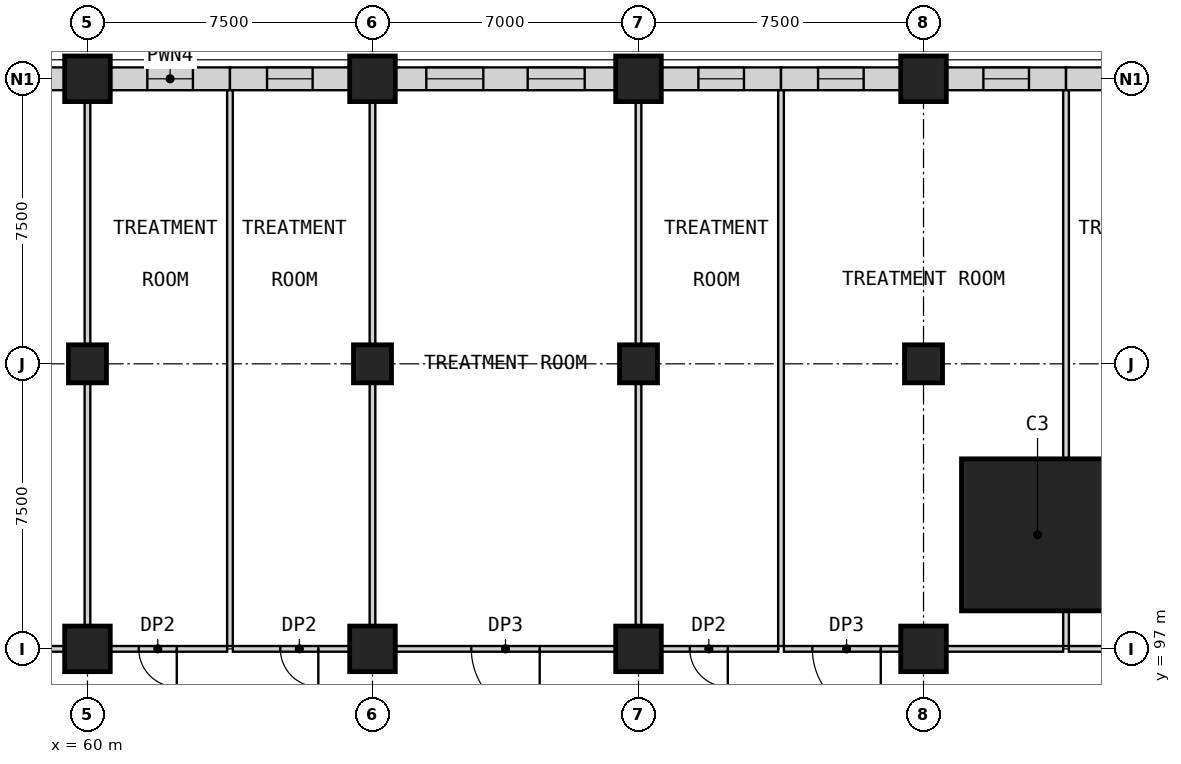
"""IFC4 building model, lengths in metres.
Left out: names, types, materials, properties, quantities, classifications, styles, units other than length and angle.
Written with IfcOpenShell. Run it as: python <this file> out.ifc"""

import sys

from ifc_helpers import new_model, si_unit, direction, frame, frame_2d, origin, origin_2d, place, context, subcontext, project, spatial, rectangle, extrude, element, fill, save


model = new_model("IFC4")
c1 = context("Model", 3, precision=1e-05, world=origin(), true_north=direction((0.0, 1.0)))
c2 = subcontext(c1, "Body", "Model", "MODEL_VIEW")
j1 = project(units=[si_unit("LENGTHUNIT", "METRE"), si_unit("PLANEANGLEUNIT", "RADIAN")], contexts=[c1])
p1 = place(None, origin())
s1 = spatial("IfcSite", under=j1, at=p1, CompositionType="ELEMENT")
p2 = place(p1, origin())
s2 = spatial("IfcBuilding", under=s1, at=p2, CompositionType="ELEMENT")
p3 = place(p2, frame((0.0, 0.0, 29.0)))
s3 = spatial("IfcBuildingStorey", under=s2, at=p3, CompositionType="ELEMENT", Elevation=29.0)
p4 = place(p3, frame((60.0, 97.0, 0.0), z_axis=(0.0, 0.0, 1.0), x_axis=(1.0, 0.0, 0.0)))
e1 = element("IfcColumn", 1, at=p4, inside=s3, PredefinedType="COLUMN", context=c2, shape_type="SweptSolid", body=[
    extrude(rectangle(XDim=1.2, YDim=1.2, at=origin_2d()), origin(), (0.0, 0.0, 1.0), 5.0),
])
p5 = place(p3, frame((60.0, 104.5, 0.0), z_axis=(0.0, 0.0, 1.0), x_axis=(1.0, 0.0, 0.0)))
e2 = element("IfcColumn", 2, at=p5, inside=s3, PredefinedType="COLUMN", context=c2, shape_type="SweptSolid", body=[
    extrude(rectangle(XDim=1.0, YDim=1.0, at=origin_2d()), origin(), (0.0, 0.0, 1.0), 5.0),
])
p6 = place(p3, frame((67.5, 97.0, 0.0), z_axis=(0.0, 0.0, 1.0), x_axis=(1.0, 0.0, 0.0)))
e3 = element("IfcColumn", 3, at=p6, inside=s3, PredefinedType="COLUMN", context=c2, shape_type="SweptSolid", body=[
    extrude(rectangle(XDim=1.2, YDim=1.2, at=origin_2d()), origin(), (0.0, 0.0, 1.0), 5.0),
])
p7 = place(p3, frame((67.5, 104.5, 0.0), z_axis=(0.0, 0.0, 1.0), x_axis=(1.0, 0.0, 0.0)))
e4 = element("IfcColumn", 4, at=p7, inside=s3, PredefinedType="COLUMN", context=c2, shape_type="SweptSolid", body=[
    extrude(rectangle(XDim=1.0, YDim=1.0, at=origin_2d()), origin(), (0.0, 0.0, 1.0), 5.0),
])
p8 = place(p3, frame((74.5, 97.0, 0.0), z_axis=(0.0, 0.0, 1.0), x_axis=(1.0, 0.0, 0.0)))
e5 = element("IfcColumn", 5, at=p8, inside=s3, PredefinedType="COLUMN", context=c2, shape_type="SweptSolid", body=[
    extrude(rectangle(XDim=1.2, YDim=1.2, at=origin_2d()), origin(), (0.0, 0.0, 1.0), 5.0),
])
p9 = place(p3, frame((74.5, 104.5, 0.0), z_axis=(0.0, 0.0, 1.0), x_axis=(1.0, 0.0, 0.0)))
e6 = element("IfcColumn", 6, at=p9, inside=s3, PredefinedType="COLUMN", context=c2, shape_type="SweptSolid", body=[
    extrude(rectangle(XDim=1.0, YDim=1.0, at=origin_2d()), origin(), (0.0, 0.0, 1.0), 5.0),
])
p10 = place(p3, frame((82.0, 97.0, 0.0), z_axis=(0.0, 0.0, 1.0), x_axis=(1.0, 0.0, 0.0)))
e7 = element("IfcColumn", 7, at=p10, inside=s3, PredefinedType="COLUMN", context=c2, shape_type="SweptSolid", body=[
    extrude(rectangle(XDim=1.2, YDim=1.2, at=origin_2d()), origin(), (0.0, 0.0, 1.0), 5.0),
])
p11 = place(p3, frame((82.0, 104.5, 0.0), z_axis=(0.0, 0.0, 1.0), x_axis=(1.0, 0.0, 0.0)))
e8 = element("IfcColumn", 8, at=p11, inside=s3, PredefinedType="COLUMN", context=c2, shape_type="SweptSolid", body=[
    extrude(rectangle(XDim=1.0, YDim=1.0, at=origin_2d()), origin(), (0.0, 0.0, 1.0), 5.0),
])
p12 = place(p3, frame((85.0, 100.0, 0.0), z_axis=(0.0, 0.0, 1.0), x_axis=(1.0, 0.0, 0.0)))
e9 = element("IfcColumn", 9, at=p12, inside=s3, PredefinedType="COLUMN", context=c2, shape_type="SweptSolid", body=[
    extrude(rectangle(XDim=4.0, YDim=4.0, at=origin_2d()), origin(), (0.0, 0.0, 1.0), 5.0),
])
for number, where, z_axis, x_axis in (
    (10, (60.0, 112.0, 0.0), (0.0, 0.0, 1.0), (1.0, 0.0, 0.0)),
    (11, (67.5, 112.0, 0.0), (0.0, 0.0, 1.0), (1.0, 0.0, 0.0)),
    (12, (74.5, 112.0, 0.0), (0.0, 0.0, 1.0), (1.0, 0.0, 0.0)),
    (13, (82.0, 112.0, 0.0), (0.0, 0.0, 1.0), (1.0, 0.0, 0.0)),
):
    element("IfcColumn", number, at=place(p3, frame(where, z_axis=z_axis, x_axis=x_axis)), inside=s3, PredefinedType="COLUMN", context=c2, shape_type="SweptSolid", body=[
        extrude(rectangle(XDim=1.2, YDim=1.2, at=origin_2d()), origin(), (0.0, 0.0, 1.0), 5.0),
    ])
p13 = place(p3, frame((53.1, 97.0, 0.0), z_axis=(0.0, 0.0, 1.0), x_axis=(1.0, 0.0, 0.0)))
e14 = element("IfcWall", 14, at=p13, inside=s3, PredefinedType="PARTITIONING", context=c2, shape_type="SweptSolid", body=[
    extrude(rectangle(XDim=6.3, YDim=0.15, at=frame_2d((3.15, 0.0))), origin(), (0.0, 0.0, 1.0), 4.7),
])
p14 = place(p3, frame((63.675, 97.0, 0.0), z_axis=(0.0, 0.0, 1.0), x_axis=(-1.0, 0.0, 0.0)))
e15 = element("IfcWall", 15, at=p14, inside=s3, PredefinedType="PARTITIONING", context=c2, shape_type="SweptSolid", body=[
    extrude(rectangle(XDim=3.075, YDim=0.15, at=frame_2d((1.538, 0.0))), origin(), (0.0, 0.0, 1.0), 4.7),
])
p15 = place(p14, frame((1.325, 0.0, 0.0)))
e16 = element("IfcOpeningElement", 16, at=p15, cuts=e15, PredefinedType="OPENING", context=c2, shape_type="SweptSolid", body=[
    extrude(rectangle(XDim=1.0, YDim=2.1, at=frame_2d((0.5, 1.05))), frame((0.0, 0.085, 0.0), z_axis=(0.0, -1.0, 0.0), x_axis=(1.0, 0.0, 0.0)), (0.0, 0.0, 1.0), 0.17),
])
p16 = place(p3, frame((66.9, 97.0, 0.0), z_axis=(0.0, 0.0, 1.0), x_axis=(-1.0, 0.0, 0.0)))
e17 = element("IfcWall", 17, at=p16, inside=s3, PredefinedType="PARTITIONING", context=c2, shape_type="SweptSolid", body=[
    extrude(rectangle(XDim=3.075, YDim=0.15, at=frame_2d((1.538, 0.0))), origin(), (0.0, 0.0, 1.0), 4.7),
])
p17 = place(p16, frame((0.825, 0.0, 0.0)))
e18 = element("IfcOpeningElement", 18, at=p17, cuts=e17, PredefinedType="OPENING", context=c2, shape_type="SweptSolid", body=[
    extrude(rectangle(XDim=1.0, YDim=2.1, at=frame_2d((0.5, 1.05))), frame((0.0, 0.085, 0.0), z_axis=(0.0, -1.0, 0.0), x_axis=(1.0, 0.0, 0.0)), (0.0, 0.0, 1.0), 0.17),
])
p18 = place(p3, frame((73.9, 97.0, 0.0), z_axis=(0.0, 0.0, 1.0), x_axis=(-1.0, 0.0, 0.0)))
e19 = element("IfcWall", 19, at=p18, inside=s3, PredefinedType="PARTITIONING", context=c2, shape_type="SweptSolid", body=[
    extrude(rectangle(XDim=5.8, YDim=0.15, at=frame_2d((2.9, 0.0))), origin(), (0.0, 0.0, 1.0), 4.7),
])
p19 = place(p18, frame((2.0, 0.0, 0.0)))
e20 = element("IfcOpeningElement", 20, at=p19, cuts=e19, PredefinedType="OPENING", context=c2, shape_type="SweptSolid", body=[
    extrude(rectangle(XDim=1.8, YDim=2.4, at=frame_2d((0.9, 1.2))), frame((0.0, 0.085, 0.0), z_axis=(0.0, -1.0, 0.0), x_axis=(1.0, 0.0, 0.0)), (0.0, 0.0, 1.0), 0.17),
])
p20 = place(p3, frame((78.175, 97.0, 0.0), z_axis=(0.0, 0.0, 1.0), x_axis=(-1.0, 0.0, 0.0)))
e21 = element("IfcWall", 21, at=p20, inside=s3, PredefinedType="PARTITIONING", context=c2, shape_type="SweptSolid", body=[
    extrude(rectangle(XDim=3.075, YDim=0.15, at=frame_2d((1.538, 0.0))), origin(), (0.0, 0.0, 1.0), 4.7),
])
p21 = place(p20, frame((1.325, 0.0, 0.0)))
e22 = element("IfcOpeningElement", 22, at=p21, cuts=e21, PredefinedType="OPENING", context=c2, shape_type="SweptSolid", body=[
    extrude(rectangle(XDim=1.0, YDim=2.1, at=frame_2d((0.5, 1.05))), frame((0.0, 0.085, 0.0), z_axis=(0.0, -1.0, 0.0), x_axis=(1.0, 0.0, 0.0)), (0.0, 0.0, 1.0), 0.17),
])
p22 = place(p3, frame((81.4, 97.0, 0.0), z_axis=(0.0, 0.0, 1.0), x_axis=(-1.0, 0.0, 0.0)))
e23 = element("IfcWall", 23, at=p22, inside=s3, PredefinedType="PARTITIONING", context=c2, shape_type="SweptSolid", body=[
    extrude(rectangle(XDim=3.075, YDim=0.15, at=frame_2d((1.538, 0.0))), origin(), (0.0, 0.0, 1.0), 4.7),
])
p23 = place(p22, frame((0.525, 0.0, 0.0)))
e24 = element("IfcOpeningElement", 24, at=p23, cuts=e23, PredefinedType="OPENING", context=c2, shape_type="SweptSolid", body=[
    extrude(rectangle(XDim=1.8, YDim=2.4, at=frame_2d((0.9, 1.2))), frame((0.0, 0.085, 0.0), z_axis=(0.0, -1.0, 0.0), x_axis=(1.0, 0.0, 0.0)), (0.0, 0.0, 1.0), 0.17),
])
p24 = place(p3, frame((82.6, 97.0, 0.0), z_axis=(0.0, 0.0, 1.0), x_axis=(1.0, 0.0, 0.0)))
e25 = element("IfcWall", 25, at=p24, inside=s3, PredefinedType="PARTITIONING", context=c2, shape_type="SweptSolid", body=[
    extrude(rectangle(XDim=3.075, YDim=0.15, at=frame_2d((1.538, 0.0))), origin(), (0.0, 0.0, 1.0), 4.7),
])
p25 = place(p3, frame((89.0, 97.0, 0.0), z_axis=(0.0, 0.0, 1.0), x_axis=(-1.0, 0.0, 0.0)))
e26 = element("IfcWall", 26, at=p25, inside=s3, PredefinedType="PARTITIONING", context=c2, shape_type="SweptSolid", body=[
    extrude(rectangle(XDim=3.175, YDim=0.15, at=frame_2d((1.587, 0.0))), origin(), (0.0, 0.0, 1.0), 4.7),
])
p26 = place(p25, frame((0.925, 0.0, 0.0)))
e27 = element("IfcOpeningElement", 27, at=p26, cuts=e26, PredefinedType="OPENING", context=c2, shape_type="SweptSolid", body=[
    extrude(rectangle(XDim=1.0, YDim=2.1, at=frame_2d((0.5, 1.05))), frame((0.0, 0.085, 0.0), z_axis=(0.0, -1.0, 0.0), x_axis=(1.0, 0.0, 0.0)), (0.0, 0.0, 1.0), 0.17),
])
p27 = place(p3, frame((53.1, 112.0, 0.0), z_axis=(0.0, 0.0, 1.0), x_axis=(1.0, 0.0, 0.0)))
e28 = element("IfcWall", 28, at=p27, inside=s3, PredefinedType="PARTITIONING", context=c2, shape_type="SweptSolid", body=[
    extrude(rectangle(XDim=6.3, YDim=0.6, at=frame_2d((3.15, 0.0))), origin(), (0.0, 0.0, 1.0), 4.7),
])
p28 = place(p27, frame((0.951, 0.0, 0.9)))
e29 = element("IfcOpeningElement", 29, at=p28, cuts=e28, PredefinedType="OPENING", context=c2, shape_type="SweptSolid", body=[
    extrude(rectangle(XDim=1.5, YDim=2.8, at=frame_2d((0.75, 1.4))), frame((0.0, 0.31, 0.0), z_axis=(0.0, -1.0, 0.0), x_axis=(1.0, 0.0, 0.0)), (0.0, 0.0, 1.0), 0.62),
])
p29 = place(p27, frame((3.849, 0.0, 0.9)))
e30 = element("IfcOpeningElement", 30, at=p29, cuts=e28, PredefinedType="OPENING", context=c2, shape_type="SweptSolid", body=[
    extrude(rectangle(XDim=1.5, YDim=2.8, at=frame_2d((0.75, 1.4))), frame((0.0, 0.31, 0.0), z_axis=(0.0, -1.0, 0.0), x_axis=(1.0, 0.0, 0.0)), (0.0, 0.0, 1.0), 0.62),
])
p30 = place(p3, frame((60.6, 112.0, 0.0), z_axis=(0.0, 0.0, 1.0), x_axis=(1.0, 0.0, 0.0)))
e31 = element("IfcWall", 31, at=p30, inside=s3, PredefinedType="PARTITIONING", context=c2, shape_type="SweptSolid", body=[
    extrude(rectangle(XDim=3.15, YDim=0.6, at=frame_2d((1.575, 0.0))), origin(), (0.0, 0.0, 1.0), 4.7),
])
p31 = place(p30, frame((0.975, 0.0, 0.9)))
e32 = element("IfcOpeningElement", 32, at=p31, cuts=e31, PredefinedType="OPENING", context=c2, shape_type="SweptSolid", body=[
    extrude(rectangle(XDim=1.2, YDim=2.8, at=frame_2d((0.6, 1.4))), frame((0.0, 0.31, 0.0), z_axis=(0.0, -1.0, 0.0), x_axis=(1.0, 0.0, 0.0)), (0.0, 0.0, 1.0), 0.62),
])
p32 = place(p3, frame((63.75, 112.0, 0.0), z_axis=(0.0, 0.0, 1.0), x_axis=(1.0, 0.0, 0.0)))
e33 = element("IfcWall", 33, at=p32, inside=s3, PredefinedType="PARTITIONING", context=c2, shape_type="SweptSolid", body=[
    extrude(rectangle(XDim=3.15, YDim=0.6, at=frame_2d((1.575, 0.0))), origin(), (0.0, 0.0, 1.0), 4.7),
])
p33 = place(p32, frame((0.975, 0.0, 0.9)))
e34 = element("IfcOpeningElement", 34, at=p33, cuts=e33, PredefinedType="OPENING", context=c2, shape_type="SweptSolid", body=[
    extrude(rectangle(XDim=1.2, YDim=2.8, at=frame_2d((0.6, 1.4))), frame((0.0, 0.31, 0.0), z_axis=(0.0, -1.0, 0.0), x_axis=(1.0, 0.0, 0.0)), (0.0, 0.0, 1.0), 0.62),
])
p34 = place(p3, frame((68.1, 112.0, 0.0), z_axis=(0.0, 0.0, 1.0), x_axis=(1.0, 0.0, 0.0)))
e35 = element("IfcWall", 35, at=p34, inside=s3, PredefinedType="PARTITIONING", context=c2, shape_type="SweptSolid", body=[
    extrude(rectangle(XDim=5.8, YDim=0.6, at=frame_2d((2.9, 0.0))), origin(), (0.0, 0.0, 1.0), 4.7),
])
p35 = place(p34, frame((0.816, 0.0, 0.9)))
e36 = element("IfcOpeningElement", 36, at=p35, cuts=e35, PredefinedType="OPENING", context=c2, shape_type="SweptSolid", body=[
    extrude(rectangle(XDim=1.5, YDim=2.8, at=frame_2d((0.75, 1.4))), frame((0.0, 0.31, 0.0), z_axis=(0.0, -1.0, 0.0), x_axis=(1.0, 0.0, 0.0)), (0.0, 0.0, 1.0), 0.62),
])
p36 = place(p34, frame((3.484, 0.0, 0.9)))
e37 = element("IfcOpeningElement", 37, at=p36, cuts=e35, PredefinedType="OPENING", context=c2, shape_type="SweptSolid", body=[
    extrude(rectangle(XDim=1.5, YDim=2.8, at=frame_2d((0.75, 1.4))), frame((0.0, 0.31, 0.0), z_axis=(0.0, -1.0, 0.0), x_axis=(1.0, 0.0, 0.0)), (0.0, 0.0, 1.0), 0.62),
])
p37 = place(p3, frame((75.1, 112.0, 0.0), z_axis=(0.0, 0.0, 1.0), x_axis=(1.0, 0.0, 0.0)))
e38 = element("IfcWall", 38, at=p37, inside=s3, PredefinedType="PARTITIONING", context=c2, shape_type="SweptSolid", body=[
    extrude(rectangle(XDim=3.15, YDim=0.6, at=frame_2d((1.575, 0.0))), origin(), (0.0, 0.0, 1.0), 4.7),
])
p38 = place(p37, frame((0.975, 0.0, 0.9)))
e39 = element("IfcOpeningElement", 39, at=p38, cuts=e38, PredefinedType="OPENING", context=c2, shape_type="SweptSolid", body=[
    extrude(rectangle(XDim=1.2, YDim=2.8, at=frame_2d((0.6, 1.4))), frame((0.0, 0.31, 0.0), z_axis=(0.0, -1.0, 0.0), x_axis=(1.0, 0.0, 0.0)), (0.0, 0.0, 1.0), 0.62),
])
p39 = place(p3, frame((78.25, 112.0, 0.0), z_axis=(0.0, 0.0, 1.0), x_axis=(1.0, 0.0, 0.0)))
e40 = element("IfcWall", 40, at=p39, inside=s3, PredefinedType="PARTITIONING", context=c2, shape_type="SweptSolid", body=[
    extrude(rectangle(XDim=3.15, YDim=0.6, at=frame_2d((1.575, 0.0))), origin(), (0.0, 0.0, 1.0), 4.7),
])
p40 = place(p39, frame((0.975, 0.0, 0.9)))
e41 = element("IfcOpeningElement", 41, at=p40, cuts=e40, PredefinedType="OPENING", context=c2, shape_type="SweptSolid", body=[
    extrude(rectangle(XDim=1.2, YDim=2.8, at=frame_2d((0.6, 1.4))), frame((0.0, 0.31, 0.0), z_axis=(0.0, -1.0, 0.0), x_axis=(1.0, 0.0, 0.0)), (0.0, 0.0, 1.0), 0.62),
])
p41 = place(p3, frame((82.6, 112.0, 0.0), z_axis=(0.0, 0.0, 1.0), x_axis=(1.0, 0.0, 0.0)))
e42 = element("IfcWall", 42, at=p41, inside=s3, PredefinedType="PARTITIONING", context=c2, shape_type="SweptSolid", body=[
    extrude(rectangle(XDim=3.15, YDim=0.6, at=frame_2d((1.575, 0.0))), origin(), (0.0, 0.0, 1.0), 4.7),
])
p42 = place(p41, frame((0.975, 0.0, 0.9)))
e43 = element("IfcOpeningElement", 43, at=p42, cuts=e42, PredefinedType="OPENING", context=c2, shape_type="SweptSolid", body=[
    extrude(rectangle(XDim=1.2, YDim=2.8, at=frame_2d((0.6, 1.4))), frame((0.0, 0.31, 0.0), z_axis=(0.0, -1.0, 0.0), x_axis=(1.0, 0.0, 0.0)), (0.0, 0.0, 1.0), 0.62),
])
p43 = place(p3, frame((85.75, 112.0, 0.0), z_axis=(0.0, 0.0, 1.0), x_axis=(1.0, 0.0, 0.0)))
e44 = element("IfcWall", 44, at=p43, inside=s3, PredefinedType="PARTITIONING", context=c2, shape_type="SweptSolid", body=[
    extrude(rectangle(XDim=3.15, YDim=0.6, at=frame_2d((1.575, 0.0))), origin(), (0.0, 0.0, 1.0), 4.7),
])
p44 = place(p43, frame((0.975, 0.0, 0.9)))
e45 = element("IfcOpeningElement", 45, at=p44, cuts=e44, PredefinedType="OPENING", context=c2, shape_type="SweptSolid", body=[
    extrude(rectangle(XDim=1.2, YDim=2.8, at=frame_2d((0.6, 1.4))), frame((0.0, 0.31, 0.0), z_axis=(0.0, -1.0, 0.0), x_axis=(1.0, 0.0, 0.0)), (0.0, 0.0, 1.0), 0.62),
])
for number, where, z_axis, x_axis in (
    (46, (60.0, 97.6, 0.0), (0.0, 0.0, 1.0), (0.0, 1.0, 0.0)),
    (47, (60.0, 105.0, 0.0), (0.0, 0.0, 1.0), (0.0, 1.0, 0.0)),
    (48, (67.5, 97.6, 0.0), (0.0, 0.0, 1.0), (0.0, 1.0, 0.0)),
    (49, (67.5, 105.0, 0.0), (0.0, 0.0, 1.0), (0.0, 1.0, 0.0)),
):
    element("IfcWall", number, at=place(p3, frame(where, z_axis=z_axis, x_axis=x_axis)), inside=s3, PredefinedType="PARTITIONING", context=c2, shape_type="SweptSolid", body=[
        extrude(rectangle(XDim=6.4, YDim=0.15, at=frame_2d((3.2, 0.0))), origin(), (0.0, 0.0, 1.0), 4.7),
    ])
for number, where, z_axis, x_axis in (
    (50, (78.25, 97.075, 0.0), (0.0, 0.0, 1.0), (0.0, 1.0, 0.0)),
    (51, (63.75, 97.075, 0.0), (0.0, 0.0, 1.0), (0.0, 1.0, 0.0)),
):
    element("IfcWall", number, at=place(p3, frame(where, z_axis=z_axis, x_axis=x_axis)), inside=s3, PredefinedType="PARTITIONING", context=c2, shape_type="SweptSolid", body=[
        extrude(rectangle(XDim=14.625, YDim=0.15, at=frame_2d((7.312, 0.0))), origin(), (0.0, 0.0, 1.0), 4.25),
    ])
for number, where, z_axis, x_axis in (
    (52, (74.5, 97.6, 0.0), (0.0, 0.0, 1.0), (0.0, 1.0, 0.0)),
    (53, (74.5, 105.0, 0.0), (0.0, 0.0, 1.0), (0.0, 1.0, 0.0)),
):
    element("IfcWall", number, at=place(p3, frame(where, z_axis=z_axis, x_axis=x_axis)), inside=s3, PredefinedType="PARTITIONING", context=c2, shape_type="SweptSolid", body=[
        extrude(rectangle(XDim=6.4, YDim=0.15, at=frame_2d((3.2, 0.0))), origin(), (0.0, 0.0, 1.0), 4.7),
    ])
p45 = place(p3, frame((85.75, 97.075, 0.0), z_axis=(0.0, 0.0, 1.0), x_axis=(0.0, 1.0, 0.0)))
e54 = element("IfcWall", 54, at=p45, inside=s3, PredefinedType="PARTITIONING", context=c2, shape_type="SweptSolid", body=[
    extrude(rectangle(XDim=0.925, YDim=0.15, at=frame_2d((0.462, 0.0))), origin(), (0.0, 0.0, 1.0), 4.7),
])
p46 = place(p3, frame((85.75, 102.0, 0.0), z_axis=(0.0, 0.0, 1.0), x_axis=(0.0, 1.0, 0.0)))
e55 = element("IfcWall", 55, at=p46, inside=s3, PredefinedType="PARTITIONING", context=c2, shape_type="SweptSolid", body=[
    extrude(rectangle(XDim=9.7, YDim=0.15, at=frame_2d((4.85, 0.0))), origin(), (0.0, 0.0, 1.0), 4.7),
])
p47 = place(p15, origin())
e56 = element("IfcDoor", 56, at=p47, inside=s3, OperationType="SINGLE_SWING_LEFT", PredefinedType="DOOR", context=c2, shape_type="SweptSolid", body=[
    extrude(rectangle(XDim=1.0, YDim=2.1, at=frame_2d((0.5, 1.05))), frame((0.0, 0.025, 0.0), z_axis=(0.0, -1.0, 0.0), x_axis=(1.0, 0.0, 0.0)), (0.0, 0.0, 1.0), 0.05),
])
fill(e16, e56)
p48 = place(p17, origin())
e57 = element("IfcDoor", 57, at=p48, inside=s3, OperationType="SINGLE_SWING_LEFT", PredefinedType="DOOR", context=c2, shape_type="SweptSolid", body=[
    extrude(rectangle(XDim=1.0, YDim=2.1, at=frame_2d((0.5, 1.05))), frame((0.0, 0.025, 0.0), z_axis=(0.0, -1.0, 0.0), x_axis=(1.0, 0.0, 0.0)), (0.0, 0.0, 1.0), 0.05),
])
fill(e18, e57)
p49 = place(p19, origin())
e58 = element("IfcDoor", 58, at=p49, inside=s3, OperationType="SINGLE_SWING_LEFT", PredefinedType="DOOR", context=c2, shape_type="SweptSolid", body=[
    extrude(rectangle(XDim=1.8, YDim=2.4, at=frame_2d((0.9, 1.2))), frame((0.0, 0.025, 0.0), z_axis=(0.0, -1.0, 0.0), x_axis=(1.0, 0.0, 0.0)), (0.0, 0.0, 1.0), 0.05),
])
fill(e20, e58)
p50 = place(p21, origin())
e59 = element("IfcDoor", 59, at=p50, inside=s3, OperationType="SINGLE_SWING_LEFT", PredefinedType="DOOR", context=c2, shape_type="SweptSolid", body=[
    extrude(rectangle(XDim=1.0, YDim=2.1, at=frame_2d((0.5, 1.05))), frame((0.0, 0.025, 0.0), z_axis=(0.0, -1.0, 0.0), x_axis=(1.0, 0.0, 0.0)), (0.0, 0.0, 1.0), 0.05),
])
fill(e22, e59)
p51 = place(p23, origin())
e60 = element("IfcDoor", 60, at=p51, inside=s3, OperationType="SINGLE_SWING_LEFT", PredefinedType="DOOR", context=c2, shape_type="SweptSolid", body=[
    extrude(rectangle(XDim=1.8, YDim=2.4, at=frame_2d((0.9, 1.2))), frame((0.0, 0.025, 0.0), z_axis=(0.0, -1.0, 0.0), x_axis=(1.0, 0.0, 0.0)), (0.0, 0.0, 1.0), 0.05),
])
fill(e24, e60)
p52 = place(p31, origin())
e61 = element("IfcWindow", 61, at=p52, inside=s3, PartitioningType="SINGLE_PANEL", PredefinedType="WINDOW", context=c2, shape_type="SweptSolid", body=[
    extrude(rectangle(XDim=1.2, YDim=2.8, at=frame_2d((0.6, 1.4))), frame((0.0, 0.03, 0.0), z_axis=(0.0, -1.0, 0.0), x_axis=(1.0, 0.0, 0.0)), (0.0, 0.0, 1.0), 0.06),
])
fill(e32, e61)
p53 = place(p33, origin())
e62 = element("IfcWindow", 62, at=p53, inside=s3, PartitioningType="SINGLE_PANEL", PredefinedType="WINDOW", context=c2, shape_type="SweptSolid", body=[
    extrude(rectangle(XDim=1.2, YDim=2.8, at=frame_2d((0.6, 1.4))), frame((0.0, 0.03, 0.0), z_axis=(0.0, -1.0, 0.0), x_axis=(1.0, 0.0, 0.0)), (0.0, 0.0, 1.0), 0.06),
])
fill(e34, e62)
p54 = place(p35, origin())
e63 = element("IfcWindow", 63, at=p54, inside=s3, PartitioningType="SINGLE_PANEL", PredefinedType="WINDOW", context=c2, shape_type="SweptSolid", body=[
    extrude(rectangle(XDim=1.5, YDim=2.8, at=frame_2d((0.75, 1.4))), frame((0.0, 0.03, 0.0), z_axis=(0.0, -1.0, 0.0), x_axis=(1.0, 0.0, 0.0)), (0.0, 0.0, 1.0), 0.06),
])
fill(e36, e63)
p55 = place(p36, origin())
e64 = element("IfcWindow", 64, at=p55, inside=s3, PartitioningType="SINGLE_PANEL", PredefinedType="WINDOW", context=c2, shape_type="SweptSolid", body=[
    extrude(rectangle(XDim=1.5, YDim=2.8, at=frame_2d((0.75, 1.4))), frame((0.0, 0.03, 0.0), z_axis=(0.0, -1.0, 0.0), x_axis=(1.0, 0.0, 0.0)), (0.0, 0.0, 1.0), 0.06),
])
fill(e37, e64)
p56 = place(p38, origin())
e65 = element("IfcWindow", 65, at=p56, inside=s3, PartitioningType="SINGLE_PANEL", PredefinedType="WINDOW", context=c2, shape_type="SweptSolid", body=[
    extrude(rectangle(XDim=1.2, YDim=2.8, at=frame_2d((0.6, 1.4))), frame((0.0, 0.03, 0.0), z_axis=(0.0, -1.0, 0.0), x_axis=(1.0, 0.0, 0.0)), (0.0, 0.0, 1.0), 0.06),
])
fill(e39, e65)
p57 = place(p40, origin())
e66 = element("IfcWindow", 66, at=p57, inside=s3, PartitioningType="SINGLE_PANEL", PredefinedType="WINDOW", context=c2, shape_type="SweptSolid", body=[
    extrude(rectangle(XDim=1.2, YDim=2.8, at=frame_2d((0.6, 1.4))), frame((0.0, 0.03, 0.0), z_axis=(0.0, -1.0, 0.0), x_axis=(1.0, 0.0, 0.0)), (0.0, 0.0, 1.0), 0.06),
])
fill(e41, e66)
p58 = place(p42, origin())
e67 = element("IfcWindow", 67, at=p58, inside=s3, PartitioningType="SINGLE_PANEL", PredefinedType="WINDOW", context=c2, shape_type="SweptSolid", body=[
    extrude(rectangle(XDim=1.2, YDim=2.8, at=frame_2d((0.6, 1.4))), frame((0.0, 0.03, 0.0), z_axis=(0.0, -1.0, 0.0), x_axis=(1.0, 0.0, 0.0)), (0.0, 0.0, 1.0), 0.06),
])
fill(e43, e67)
save(model, sys.argv[1])
